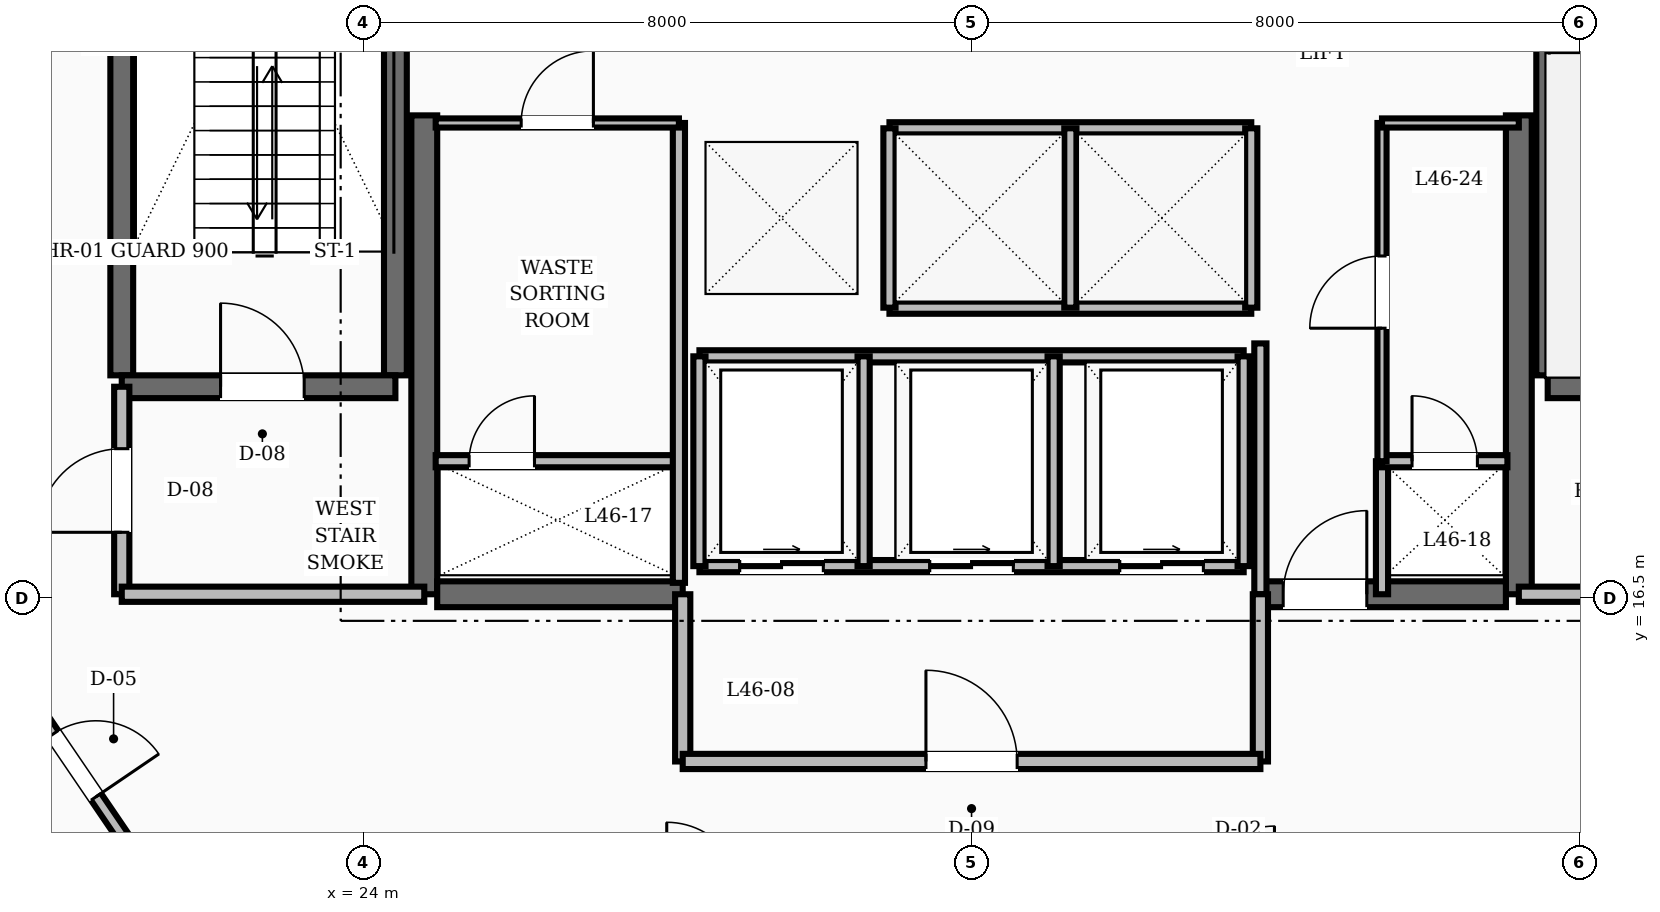
"""IFC4 building model, lengths in metres.
Left out: names, types, materials, properties, quantities, classifications, styles, units other than length and angle.
Written with IfcOpenShell. Run it as: python <this file> out.ifc"""

import sys

from ifc_helpers import new_model, si_unit, direction, frame, frame_2d, origin, place, context, subcontext, project, spatial, rectangle, extrude, element, fill, save


model = new_model("IFC4")
c1 = context("Model", 3, precision=1e-05, world=origin(), true_north=direction((0.0, 1.0)))
c2 = subcontext(c1, "Body", "Model", "MODEL_VIEW")
j1 = project(units=[si_unit("LENGTHUNIT", "METRE"), si_unit("PLANEANGLEUNIT", "RADIAN")], contexts=[c1])
p1 = place(None, origin())
s1 = spatial("IfcSite", under=j1, at=p1, CompositionType="ELEMENT")
p2 = place(p1, origin())
s2 = spatial("IfcBuilding", under=s1, at=p2, CompositionType="ELEMENT")
p3 = place(p2, frame((0.0, 0.0, 178.4)))
s3 = spatial("IfcBuildingStorey", under=s2, at=p3, CompositionType="ELEMENT", Elevation=178.4)
for number, where, z_axis, x_axis in (
    (1, (24.8, 16.55, 0.0), (0.0, 0.0, 1.0), (0.0, 1.0, 0.0)),
    (2, (39.2, 16.55, 0.0), (0.0, 0.0, 1.0), (0.0, 1.0, 0.0)),
):
    element("IfcWall", number, at=place(p3, frame(where, z_axis=z_axis, x_axis=x_axis)), inside=s3, PredefinedType="SHEAR", context=c2, shape_type="SweptSolid", body=[
        extrude(rectangle(XDim=6.3, YDim=0.34, at=frame_2d((3.15, 0.0))), origin(), (0.0, 0.0, 1.0), 3.6),
    ])
p4 = place(p3, frame((24.97, 16.55, 0.0), z_axis=(0.0, 0.0, 1.0), x_axis=(1.0, 0.0, 0.0)))
e3 = element("IfcWall", 3, at=p4, inside=s3, PredefinedType="SHEAR", context=c2, shape_type="SweptSolid", body=[
    extrude(rectangle(XDim=3.23, YDim=0.34, at=frame_2d((1.615, 0.0))), origin(), (0.0, 0.0, 1.0), 3.6),
])
p5 = place(p3, frame((35.8, 16.55, 0.0), z_axis=(0.0, 0.0, 1.0), x_axis=(1.0, 0.0, 0.0)))
e4 = element("IfcWall", 4, at=p5, inside=s3, PredefinedType="SHEAR", context=c2, shape_type="SweptSolid", body=[
    extrude(rectangle(XDim=3.23, YDim=0.34, at=frame_2d((1.615, 0.0))), origin(), (0.0, 0.0, 1.0), 3.6),
])
p6 = place(p5, frame((0.3, 0.0, 0.0)))
e5 = element("IfcOpeningElement", 5, at=p6, cuts=e4, PredefinedType="OPENING", context=c2, shape_type="SweptSolid", body=[
    extrude(rectangle(XDim=1.1, YDim=2.1, at=frame_2d((0.55, 1.05))), frame((0.0, 0.18, 0.0), z_axis=(0.0, -1.0, 0.0), x_axis=(1.0, 0.0, 0.0)), (0.0, 0.0, 1.0), 0.36),
])
for number, where, z_axis, x_axis in (
    (6, (20.82, 19.43, 0.0), (0.0, 0.0, 1.0), (0.0, 1.0, 0.0)),
    (7, (24.42, 19.43, 0.0), (0.0, 0.0, 1.0), (0.0, 1.0, 0.0)),
):
    element("IfcWall", number, at=place(p3, frame(where, z_axis=z_axis, x_axis=x_axis)), inside=s3, PredefinedType="SHEAR", context=c2, shape_type="SweptSolid", body=[
        extrude(rectangle(XDim=8.74, YDim=0.3, at=frame_2d((4.37, 0.0))), origin(), (0.0, 0.0, 1.0), 3.6),
    ])
p7 = place(p3, frame((20.82, 19.28, 0.0), z_axis=(0.0, 0.0, 1.0), x_axis=(1.0, 0.0, 0.0)))
e8 = element("IfcWall", 8, at=p7, inside=s3, PredefinedType="SHEAR", context=c2, shape_type="SweptSolid", body=[
    extrude(rectangle(XDim=3.6, YDim=0.3, at=frame_2d((1.8, 0.0))), origin(), (0.0, 0.0, 1.0), 3.6),
])
p8 = place(p7, frame((1.3, 0.0, 0.0)))
e9 = element("IfcOpeningElement", 9, at=p8, cuts=e8, PredefinedType="OPENING", context=c2, shape_type="SweptSolid", body=[
    extrude(rectangle(XDim=1.1, YDim=2.1, at=frame_2d((0.55, 1.05))), frame((0.0, 0.16, 0.0), z_axis=(0.0, -1.0, 0.0), x_axis=(1.0, 0.0, 0.0)), (0.0, 0.0, 1.0), 0.32),
])
p9 = place(p3, frame((39.58, 19.43, 0.0), z_axis=(0.0, 0.0, 1.0), x_axis=(0.0, 1.0, 0.0)))
e10 = element("IfcWall", 10, at=p9, inside=s3, PredefinedType="SHEAR", context=c2, shape_type="SweptSolid", body=[
    extrude(rectangle(XDim=8.74, YDim=0.3, at=frame_2d((4.37, 0.0))), origin(), (0.0, 0.0, 1.0), 3.6),
])
p10 = place(p3, frame((39.58, 19.28, 0.0), z_axis=(0.0, 0.0, 1.0), x_axis=(1.0, 0.0, 0.0)))
e11 = element("IfcWall", 11, at=p10, inside=s3, PredefinedType="SHEAR", context=c2, shape_type="SweptSolid", body=[
    extrude(rectangle(XDim=3.6, YDim=0.3, at=frame_2d((1.8, 0.0))), origin(), (0.0, 0.0, 1.0), 3.6),
])
p11 = place(p3, frame((20.82, 16.55, 0.0), z_axis=(0.0, 0.0, 1.0), x_axis=(0.0, 1.0, 0.0)))
e12 = element("IfcWall", 12, at=p11, inside=s3, PredefinedType="SOLIDWALL", context=c2, shape_type="SweptSolid", body=[
    extrude(rectangle(XDim=2.73, YDim=0.2, at=frame_2d((1.365, 0.0))), origin(), (0.0, 0.0, 1.0), 2.8),
])
p12 = place(p11, frame((0.815, 0.0, 0.0)))
e13 = element("IfcOpeningElement", 13, at=p12, cuts=e12, PredefinedType="OPENING", context=c2, shape_type="SweptSolid", body=[
    extrude(rectangle(XDim=1.1, YDim=2.1, at=frame_2d((0.55, 1.05))), frame((0.0, 0.11, 0.0), z_axis=(0.0, -1.0, 0.0), x_axis=(1.0, 0.0, 0.0)), (0.0, 0.0, 1.0), 0.22),
])
for number, where, z_axis, x_axis in (
    (14, (20.82, 16.55, 0.0), (0.0, 0.0, 1.0), (1.0, 0.0, 0.0)),
    (15, (39.2, 16.55, 0.0), (0.0, 0.0, 1.0), (1.0, 0.0, 0.0)),
):
    element("IfcWall", number, at=place(p3, frame(where, z_axis=z_axis, x_axis=x_axis)), inside=s3, PredefinedType="SOLIDWALL", context=c2, shape_type="SweptSolid", body=[
        extrude(rectangle(XDim=3.98, YDim=0.2, at=frame_2d((1.99, 0.0))), origin(), (0.0, 0.0, 1.0), 2.8),
    ])
p13 = place(p3, frame((35.8, 16.55, 0.0), z_axis=(0.0, 0.0, 1.0), x_axis=(0.0, 1.0, 0.0)))
e16 = element("IfcWall", 16, at=p13, inside=s3, PredefinedType="SOLIDWALL", context=c2, shape_type="SweptSolid", body=[
    extrude(rectangle(XDim=3.3, YDim=0.16, at=frame_2d((1.65, 0.0))), origin(), (0.0, 0.0, 1.0), 2.8),
])
p14 = place(p3, frame((37.4, 16.55, 0.0), z_axis=(0.0, 0.0, 1.0), x_axis=(0.0, 1.0, 0.0)))
e17 = element("IfcWall", 17, at=p14, inside=s3, PredefinedType="SOLIDWALL", context=c2, shape_type="SweptSolid", body=[
    extrude(rectangle(XDim=1.75, YDim=0.16, at=frame_2d((0.875, 0.0))), origin(), (0.0, 0.0, 1.0), 2.8),
])
for number, where, z_axis, x_axis in (
    (18, (28.2, 14.35, 0.0), (0.0, 0.0, 1.0), (0.0, 1.0, 0.0)),
    (19, (35.8, 14.35, 0.0), (0.0, 0.0, 1.0), (0.0, 1.0, 0.0)),
):
    element("IfcWall", number, at=place(p3, frame(where, z_axis=z_axis, x_axis=x_axis)), inside=s3, PredefinedType="SOLIDWALL", context=c2, shape_type="SweptSolid", body=[
        extrude(rectangle(XDim=2.2, YDim=0.2, at=frame_2d((1.1, 0.0))), origin(), (0.0, 0.0, 1.0), 2.8),
    ])
p15 = place(p3, frame((28.2, 14.35, 0.0), z_axis=(0.0, 0.0, 1.0), x_axis=(1.0, 0.0, 0.0)))
e20 = element("IfcWall", 20, at=p15, inside=s3, PredefinedType="SOLIDWALL", context=c2, shape_type="SweptSolid", body=[
    extrude(rectangle(XDim=7.6, YDim=0.2, at=frame_2d((3.8, 0.0))), origin(), (0.0, 0.0, 1.0), 2.8),
])
p16 = place(p15, frame((3.2, 0.0, 0.0)))
e21 = element("IfcOpeningElement", 21, at=p16, cuts=e20, PredefinedType="OPENING", context=c2, shape_type="SweptSolid", body=[
    extrude(rectangle(XDim=1.2, YDim=2.1, at=frame_2d((0.6, 1.05))), frame((0.0, 0.11, 0.0), z_axis=(0.0, -1.0, 0.0), x_axis=(1.0, 0.0, 0.0)), (0.0, 0.0, 1.0), 0.22),
])
for number, where, z_axis, x_axis in (
    (22, (30.92, 22.68, 0.0), (0.0, 0.0, 1.0), (1.0, 0.0, 0.0)),
    (23, (30.92, 20.32, 0.0), (0.0, 0.0, 1.0), (1.0, 0.0, 0.0)),
):
    element("IfcWall", number, at=place(p3, frame(where, z_axis=z_axis, x_axis=x_axis)), inside=s3, PredefinedType="SOLIDWALL", context=c2, shape_type="SweptSolid", body=[
        extrude(rectangle(XDim=4.76, YDim=0.16, at=frame_2d((2.38, 0.0))), origin(), (0.0, 0.0, 1.0), 2.8),
    ])
for number, where, z_axis, x_axis in (
    (24, (30.92, 20.32, 0.0), (0.0, 0.0, 1.0), (0.0, 1.0, 0.0)),
    (25, (33.3, 20.32, 0.0), (0.0, 0.0, 1.0), (0.0, 1.0, 0.0)),
    (26, (35.68, 20.32, 0.0), (0.0, 0.0, 1.0), (0.0, 1.0, 0.0)),
):
    element("IfcWall", number, at=place(p3, frame(where, z_axis=z_axis, x_axis=x_axis)), inside=s3, PredefinedType="SOLIDWALL", context=c2, shape_type="SweptSolid", body=[
        extrude(rectangle(XDim=2.36, YDim=0.16, at=frame_2d((1.18, 0.0))), origin(), (0.0, 0.0, 1.0), 2.8),
    ])
p17 = place(p3, frame((28.42, 16.92, 0.0), z_axis=(0.0, 0.0, 1.0), x_axis=(1.0, 0.0, 0.0)))
e27 = element("IfcWall", 27, at=p17, inside=s3, PredefinedType="SOLIDWALL", context=c2, shape_type="SweptSolid", body=[
    extrude(rectangle(XDim=7.16, YDim=0.16, at=frame_2d((3.58, 0.0))), origin(), (0.0, 0.0, 1.0), 2.8),
])
p18 = place(p17, frame((0.53, 0.0, 0.0)))
e28 = element("IfcOpeningElement", 28, at=p18, cuts=e27, PredefinedType="OPENING", context=c2, shape_type="SweptSolid", body=[
    extrude(rectangle(XDim=1.1, YDim=2.15, at=frame_2d((0.55, 1.075))), frame((0.0, 0.09, 0.0), z_axis=(0.0, -1.0, 0.0), x_axis=(1.0, 0.0, 0.0)), (0.0, 0.0, 1.0), 0.18),
])
p19 = place(p17, frame((3.03, 0.0, 0.0)))
e29 = element("IfcOpeningElement", 29, at=p19, cuts=e27, PredefinedType="OPENING", context=c2, shape_type="SweptSolid", body=[
    extrude(rectangle(XDim=1.1, YDim=2.15, at=frame_2d((0.55, 1.075))), frame((0.0, 0.09, 0.0), z_axis=(0.0, -1.0, 0.0), x_axis=(1.0, 0.0, 0.0)), (0.0, 0.0, 1.0), 0.18),
])
p20 = place(p17, frame((5.53, 0.0, 0.0)))
e30 = element("IfcOpeningElement", 30, at=p20, cuts=e27, PredefinedType="OPENING", context=c2, shape_type="SweptSolid", body=[
    extrude(rectangle(XDim=1.1, YDim=2.15, at=frame_2d((0.55, 1.075))), frame((0.0, 0.09, 0.0), z_axis=(0.0, -1.0, 0.0), x_axis=(1.0, 0.0, 0.0)), (0.0, 0.0, 1.0), 0.18),
])
p21 = place(p3, frame((28.42, 19.68, 0.0), z_axis=(0.0, 0.0, 1.0), x_axis=(1.0, 0.0, 0.0)))
e31 = element("IfcWall", 31, at=p21, inside=s3, PredefinedType="SOLIDWALL", context=c2, shape_type="SweptSolid", body=[
    extrude(rectangle(XDim=7.16, YDim=0.16, at=frame_2d((3.58, 0.0))), origin(), (0.0, 0.0, 1.0), 2.8),
])
for number, where, z_axis, x_axis in (
    (32, (28.42, 16.92, 0.0), (0.0, 0.0, 1.0), (0.0, 1.0, 0.0)),
    (33, (30.58, 16.92, 0.0), (0.0, 0.0, 1.0), (0.0, 1.0, 0.0)),
    (34, (33.08, 16.92, 0.0), (0.0, 0.0, 1.0), (0.0, 1.0, 0.0)),
    (35, (35.58, 16.92, 0.0), (0.0, 0.0, 1.0), (0.0, 1.0, 0.0)),
):
    element("IfcWall", number, at=place(p3, frame(where, z_axis=z_axis, x_axis=x_axis)), inside=s3, PredefinedType="SOLIDWALL", context=c2, shape_type="SweptSolid", body=[
        extrude(rectangle(XDim=2.76, YDim=0.16, at=frame_2d((1.38, 0.0))), origin(), (0.0, 0.0, 1.0), 2.8),
    ])
p22 = place(p3, frame((24.95, 18.3, 0.0), z_axis=(0.0, 0.0, 1.0), x_axis=(1.0, 0.0, 0.0)))
e36 = element("IfcWall", 36, at=p22, inside=s3, PredefinedType="SOLIDWALL", context=c2, shape_type="SweptSolid", body=[
    extrude(rectangle(XDim=3.2, YDim=0.16, at=frame_2d((1.6, 0.0))), origin(), (0.0, 0.0, 1.0), 2.8),
])
p23 = place(p22, frame((0.44, 0.0, 0.0)))
e37 = element("IfcOpeningElement", 37, at=p23, cuts=e36, PredefinedType="OPENING", context=c2, shape_type="SweptSolid", body=[
    extrude(rectangle(XDim=0.86, YDim=2.05, at=frame_2d((0.43, 1.025))), frame((0.0, 0.09, 0.0), z_axis=(0.0, -1.0, 0.0), x_axis=(1.0, 0.0, 0.0)), (0.0, 0.0, 1.0), 0.18),
])
p24 = place(p3, frame((28.15, 16.7, 0.0), z_axis=(0.0, 0.0, 1.0), x_axis=(0.0, 1.0, 0.0)))
e38 = element("IfcWall", 38, at=p24, inside=s3, PredefinedType="SOLIDWALL", context=c2, shape_type="SweptSolid", body=[
    extrude(rectangle(XDim=6.05, YDim=0.16, at=frame_2d((3.025, 0.0))), origin(), (0.0, 0.0, 1.0), 2.8),
])
p25 = place(p3, frame((37.4, 18.3, 0.0), z_axis=(0.0, 0.0, 1.0), x_axis=(1.0, 0.0, 0.0)))
e39 = element("IfcWall", 39, at=p25, inside=s3, PredefinedType="SOLIDWALL", context=c2, shape_type="SweptSolid", body=[
    extrude(rectangle(XDim=1.65, YDim=0.16, at=frame_2d((0.825, 0.0))), origin(), (0.0, 0.0, 1.0), 2.8),
])
p26 = place(p25, frame((0.395, 0.0, 0.0)))
e40 = element("IfcOpeningElement", 40, at=p26, cuts=e39, PredefinedType="OPENING", context=c2, shape_type="SweptSolid", body=[
    extrude(rectangle(XDim=0.86, YDim=2.1, at=frame_2d((0.43, 1.05))), frame((0.0, 0.09, 0.0), z_axis=(0.0, -1.0, 0.0), x_axis=(1.0, 0.0, 0.0)), (0.0, 0.0, 1.0), 0.18),
])
p27 = place(p3, frame((24.95, 22.75, 0.0), z_axis=(0.0, 0.0, 1.0), x_axis=(1.0, 0.0, 0.0)))
e41 = element("IfcWall", 41, at=p27, inside=s3, PredefinedType="PARTITIONING", context=c2, shape_type="SweptSolid", body=[
    extrude(rectangle(XDim=3.2, YDim=0.12, at=frame_2d((1.6, 0.0))), origin(), (0.0, 0.0, 1.0), 2.8),
])
p28 = place(p27, frame((1.125, 0.0, 0.0)))
e42 = element("IfcOpeningElement", 42, at=p28, cuts=e41, PredefinedType="OPENING", context=c2, shape_type="SweptSolid", body=[
    extrude(rectangle(XDim=0.95, YDim=2.1, at=frame_2d((0.475, 1.05))), frame((0.0, 0.07, 0.0), z_axis=(0.0, -1.0, 0.0), x_axis=(1.0, 0.0, 0.0)), (0.0, 0.0, 1.0), 0.14),
])
p29 = place(p3, frame((37.4, 18.3, 0.0), z_axis=(0.0, 0.0, 1.0), x_axis=(0.0, 1.0, 0.0)))
e43 = element("IfcWall", 43, at=p29, inside=s3, PredefinedType="PARTITIONING", context=c2, shape_type="SweptSolid", body=[
    extrude(rectangle(XDim=4.45, YDim=0.12, at=frame_2d((2.225, 0.0))), origin(), (0.0, 0.0, 1.0), 2.8),
])
p30 = place(p29, frame((1.75, 0.0, 0.0)))
e44 = element("IfcOpeningElement", 44, at=p30, cuts=e43, PredefinedType="OPENING", context=c2, shape_type="SweptSolid", body=[
    extrude(rectangle(XDim=0.95, YDim=2.1, at=frame_2d((0.475, 1.05))), frame((0.0, 0.07, 0.0), z_axis=(0.0, -1.0, 0.0), x_axis=(1.0, 0.0, 0.0)), (0.0, 0.0, 1.0), 0.14),
])
p31 = place(p3, frame((37.4, 22.75, 0.0), z_axis=(0.0, 0.0, 1.0), x_axis=(1.0, 0.0, 0.0)))
e45 = element("IfcWall", 45, at=p31, inside=s3, PredefinedType="PARTITIONING", context=c2, shape_type="SweptSolid", body=[
    extrude(rectangle(XDim=1.8, YDim=0.12, at=frame_2d((0.9, 0.0))), origin(), (0.0, 0.0, 1.0), 2.8),
])
p32 = place(p3, frame((19.35, 15.548, 0.0), z_axis=(0.0, 0.0, 1.0), x_axis=(0.562674669208, -0.826678423955, 0.0)))
e46 = element("IfcWall", 46, at=p32, inside=s3, PredefinedType="SOLIDWALL", context=c2, shape_type="SweptSolid", body=[
    extrude(rectangle(XDim=3.021, YDim=0.16, at=frame_2d((1.511, 0.0))), origin(), (0.0, 0.0, 1.0), 2.8),
])
p33 = place(p32, frame((1.01, 0.0, 0.0)))
e47 = element("IfcOpeningElement", 47, at=p33, cuts=e46, PredefinedType="OPENING", context=c2, shape_type="SweptSolid", body=[
    extrude(rectangle(XDim=1.0, YDim=2.1, at=frame_2d((0.5, 1.05))), frame((0.0, 0.09, 0.0), z_axis=(0.0, -1.0, 0.0), x_axis=(1.0, 0.0, 0.0)), (0.0, 0.0, 1.0), 0.18),
])
p34 = place(p8, origin())
e48 = element("IfcDoor", 48, at=p34, inside=s3, OperationType="SINGLE_SWING_LEFT", PredefinedType="DOOR", context=c2, shape_type="SweptSolid", body=[
    extrude(rectangle(XDim=1.1, YDim=2.1, at=frame_2d((0.55, 1.05))), frame((0.0, 0.025, 0.0), z_axis=(0.0, -1.0, 0.0), x_axis=(1.0, 0.0, 0.0)), (0.0, 0.0, 1.0), 0.05),
])
fill(e9, e48)
p35 = place(p12, origin())
e49 = element("IfcDoor", 49, at=p35, inside=s3, OperationType="SINGLE_SWING_LEFT", PredefinedType="DOOR", context=c2, shape_type="SweptSolid", body=[
    extrude(rectangle(XDim=1.1, YDim=2.1, at=frame_2d((0.55, 1.05))), frame((0.0, 0.025, 0.0), z_axis=(0.0, -1.0, 0.0), x_axis=(1.0, 0.0, 0.0)), (0.0, 0.0, 1.0), 0.05),
])
fill(e13, e49)
p36 = place(p6, origin())
e50 = element("IfcDoor", 50, at=p36, inside=s3, OperationType="SINGLE_SWING_RIGHT", PredefinedType="DOOR", context=c2, shape_type="SweptSolid", body=[
    extrude(rectangle(XDim=1.1, YDim=2.1, at=frame_2d((0.55, 1.05))), frame((0.0, 0.025, 0.0), z_axis=(0.0, -1.0, 0.0), x_axis=(1.0, 0.0, 0.0)), (0.0, 0.0, 1.0), 0.05),
])
fill(e5, e50)
p37 = place(p16, origin())
e51 = element("IfcDoor", 51, at=p37, inside=s3, OperationType="SINGLE_SWING_LEFT", PredefinedType="DOOR", context=c2, shape_type="SweptSolid", body=[
    extrude(rectangle(XDim=1.2, YDim=2.1, at=frame_2d((0.6, 1.05))), frame((0.0, 0.025, 0.0), z_axis=(0.0, -1.0, 0.0), x_axis=(1.0, 0.0, 0.0)), (0.0, 0.0, 1.0), 0.05),
])
fill(e21, e51)
p38 = place(p18, origin())
e52 = element("IfcDoor", 52, at=p38, inside=s3, OperationType="SLIDING_TO_RIGHT", PredefinedType="DOOR", context=c2, shape_type="SweptSolid", body=[
    extrude(rectangle(XDim=1.1, YDim=2.15, at=frame_2d((0.55, 1.075))), frame((0.0, 0.025, 0.0), z_axis=(0.0, -1.0, 0.0), x_axis=(1.0, 0.0, 0.0)), (0.0, 0.0, 1.0), 0.05),
])
fill(e28, e52)
p39 = place(p19, origin())
e53 = element("IfcDoor", 53, at=p39, inside=s3, OperationType="SLIDING_TO_RIGHT", PredefinedType="DOOR", context=c2, shape_type="SweptSolid", body=[
    extrude(rectangle(XDim=1.1, YDim=2.15, at=frame_2d((0.55, 1.075))), frame((0.0, 0.025, 0.0), z_axis=(0.0, -1.0, 0.0), x_axis=(1.0, 0.0, 0.0)), (0.0, 0.0, 1.0), 0.05),
])
fill(e29, e53)
p40 = place(p20, origin())
e54 = element("IfcDoor", 54, at=p40, inside=s3, OperationType="SLIDING_TO_RIGHT", PredefinedType="DOOR", context=c2, shape_type="SweptSolid", body=[
    extrude(rectangle(XDim=1.1, YDim=2.15, at=frame_2d((0.55, 1.075))), frame((0.0, 0.025, 0.0), z_axis=(0.0, -1.0, 0.0), x_axis=(1.0, 0.0, 0.0)), (0.0, 0.0, 1.0), 0.05),
])
fill(e30, e54)
p41 = place(p23, origin())
e55 = element("IfcDoor", 55, at=p41, inside=s3, OperationType="SINGLE_SWING_RIGHT", PredefinedType="TRAPDOOR", context=c2, shape_type="SweptSolid", body=[
    extrude(rectangle(XDim=0.86, YDim=2.05, at=frame_2d((0.43, 1.025))), frame((0.0, 0.025, 0.0), z_axis=(0.0, -1.0, 0.0), x_axis=(1.0, 0.0, 0.0)), (0.0, 0.0, 1.0), 0.05),
])
fill(e37, e55)
p42 = place(p26, origin())
e56 = element("IfcDoor", 56, at=p42, inside=s3, OperationType="SINGLE_SWING_LEFT", PredefinedType="TRAPDOOR", context=c2, shape_type="SweptSolid", body=[
    extrude(rectangle(XDim=0.86, YDim=2.1, at=frame_2d((0.43, 1.05))), frame((0.0, 0.025, 0.0), z_axis=(0.0, -1.0, 0.0), x_axis=(1.0, 0.0, 0.0)), (0.0, 0.0, 1.0), 0.05),
])
fill(e40, e56)
p43 = place(p28, origin())
e57 = element("IfcDoor", 57, at=p43, inside=s3, OperationType="SINGLE_SWING_RIGHT", PredefinedType="DOOR", context=c2, shape_type="SweptSolid", body=[
    extrude(rectangle(XDim=0.95, YDim=2.1, at=frame_2d((0.475, 1.05))), frame((0.0, 0.025, 0.0), z_axis=(0.0, -1.0, 0.0), x_axis=(1.0, 0.0, 0.0)), (0.0, 0.0, 1.0), 0.05),
])
fill(e42, e57)
p44 = place(p30, origin())
e58 = element("IfcDoor", 58, at=p44, inside=s3, OperationType="SINGLE_SWING_LEFT", PredefinedType="DOOR", context=c2, shape_type="SweptSolid", body=[
    extrude(rectangle(XDim=0.95, YDim=2.1, at=frame_2d((0.475, 1.05))), frame((0.0, 0.025, 0.0), z_axis=(0.0, -1.0, 0.0), x_axis=(1.0, 0.0, 0.0)), (0.0, 0.0, 1.0), 0.05),
])
fill(e44, e58)
p45 = place(p33, origin())
e59 = element("IfcDoor", 59, at=p45, inside=s3, OperationType="SINGLE_SWING_RIGHT", PredefinedType="DOOR", context=c2, shape_type="SweptSolid", body=[
    extrude(rectangle(XDim=1.0, YDim=2.1, at=frame_2d((0.5, 1.05))), frame((0.0, 0.025, 0.0), z_axis=(0.0, -1.0, 0.0), x_axis=(1.0, 0.0, 0.0)), (0.0, 0.0, 1.0), 0.05),
])
fill(e47, e59)
save(model, sys.argv[1])
